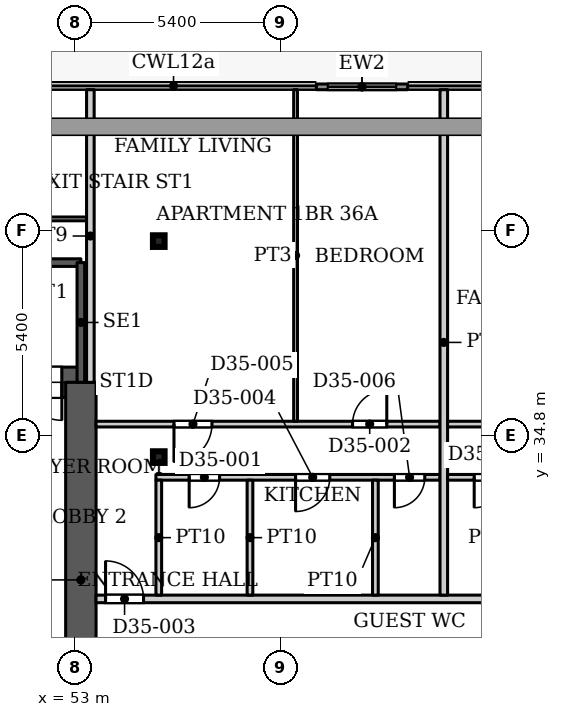
"""IFC4 building model, lengths in metres.
Left out: names, types, materials, properties, quantities, classifications, styles, units other than length and angle.
Written with IfcOpenShell. Run it as: python <this file> out.ifc"""

import sys

from ifc_helpers import new_model, si_unit, direction, frame, frame_2d, origin, origin_2d, place, context, subcontext, project, spatial, rectangle, hollow_rectangle, extrude, source, transform, mapped, element, fill, save


model = new_model("IFC4")
c1 = context("Model", 3, precision=1e-05, world=origin(), true_north=direction((0.0, 1.0)))
c2 = subcontext(c1, "Body", "Model", "MODEL_VIEW")
j1 = project(units=[si_unit("LENGTHUNIT", "METRE"), si_unit("PLANEANGLEUNIT", "RADIAN")], contexts=[c1])
p1 = place(None, origin())
s1 = spatial("IfcSite", under=j1, at=p1, CompositionType="ELEMENT")
p2 = place(p1, origin())
s2 = spatial("IfcBuilding", under=s1, at=p2, CompositionType="ELEMENT")
p3 = place(p2, frame((0.0, 0.0, 156.5)))
s3 = spatial("IfcBuildingStorey", under=s2, at=p3, CompositionType="ELEMENT", Elevation=156.5)
for number, where, z_axis, x_axis in (
    (1, (55.2, 34.232, 0.0), (0.0, 0.0, 1.0), (1.0, 0.0, 0.0)),
    (2, (55.2, 39.916, 0.0), (0.0, 0.0, 1.0), (1.0, 0.0, 0.0)),
):
    element("IfcColumn", number, at=place(p3, frame(where, z_axis=z_axis, x_axis=x_axis)), inside=s3, PredefinedType="COLUMN", context=c2, shape_type="SweptSolid", body=[
        extrude(hollow_rectangle(XDim=0.305, YDim=0.305, WallThickness=0.016, InnerFilletRadius=0.016, OuterFilletRadius=0.032, at=origin_2d()), origin(), (0.0, 0.0, 1.0), 3.9),
    ])
p4 = place(p3, frame((34.75, 36.2, 0.0), z_axis=(0.0, 0.0, 1.0), x_axis=(1.0, 0.0, 0.0)))
e3 = element("IfcWall", 3, at=p4, inside=s3, PredefinedType="SHEAR", context=c2, shape_type="SweptSolid", body=[
    extrude(rectangle(XDim=18.4, YDim=0.8, at=frame_2d((9.2, 0.0))), origin(), (0.0, 0.0, 1.0), 3.9),
])
p5 = place(p4, frame((16.9, 0.0, 0.0)))
e4 = element("IfcOpeningElement", 4, at=p5, cuts=e3, PredefinedType="OPENING", context=c2, shape_type="SweptSolid", body=[
    extrude(rectangle(XDim=1.0, YDim=2.2, at=frame_2d((0.5, 1.1))), frame((0.0, 0.41, 0.0), z_axis=(0.0, -1.0, 0.0), x_axis=(1.0, 0.0, 0.0)), (0.0, 0.0, 1.0), 0.82),
])
p6 = place(p3, frame((53.15, 25.8, 0.0), z_axis=(0.0, 0.0, 1.0), x_axis=(0.0, 1.0, 0.0)))
e5 = element("IfcWall", 5, at=p6, inside=s3, PredefinedType="SHEAR", context=c2, shape_type="SweptSolid", body=[
    extrude(rectangle(XDim=10.4, YDim=0.8, at=frame_2d((5.2, 0.0))), origin(), (0.0, 0.0, 1.0), 3.9),
])
p7 = place(p3, frame((59.347, 43.975, 0.0), z_axis=(0.0, 0.0, 1.0), x_axis=(1.0, 0.0, 0.0)))
e6 = element("IfcWall", 6, at=p7, inside=s3, PredefinedType="SOLIDWALL", context=c2, shape_type="SweptSolid", body=[
    extrude(rectangle(XDim=2.401, YDim=0.15, at=frame_2d((1.201, 0.0))), origin(), (0.0, 0.0, 1.0), 3.75),
])
p8 = place(p7, frame((0.3, 0.0, 0.0)))
e7 = element("IfcOpeningElement", 7, at=p8, cuts=e6, PredefinedType="OPENING", context=c2, shape_type="SweptSolid", body=[
    extrude(rectangle(XDim=1.8, YDim=2.4, at=frame_2d((0.9, 1.2))), frame((0.0, 0.085, 0.0), z_axis=(0.0, -1.0, 0.0), x_axis=(1.0, 0.0, 0.0)), (0.0, 0.0, 1.0), 0.17),
])
p9 = place(p3, frame((43.99, 39.35, 0.0), z_axis=(0.0, 0.0, 1.0), x_axis=(1.0, 0.0, 0.0)))
e8 = element("IfcWall", 8, at=p9, inside=s3, PredefinedType="SHEAR", context=c2, shape_type="SweptSolid", body=[
    extrude(rectangle(XDim=9.16, YDim=0.2, at=frame_2d((4.58, 0.0))), origin(), (0.0, 0.0, 1.0), 3.9),
])
p10 = place(p3, frame((53.15, 36.2, 0.0), z_axis=(0.0, 0.0, 1.0), x_axis=(0.0, 1.0, 0.0)))
e9 = element("IfcWall", 9, at=p10, inside=s3, PredefinedType="SHEAR", context=c2, shape_type="SweptSolid", body=[
    extrude(rectangle(XDim=3.15, YDim=0.2, at=frame_2d((1.575, 0.0))), origin(), (0.0, 0.0, 1.0), 3.9),
])
p11 = place(p3, frame((38.399, 40.5, 0.0), z_axis=(0.0, 0.0, 1.0), x_axis=(1.0, 0.0, 0.0)))
e10 = element("IfcWall", 10, at=p11, inside=s3, PredefinedType="PARTITIONING", context=c2, shape_type="SweptSolid", body=[
    extrude(rectangle(XDim=14.901, YDim=0.1, at=frame_2d((7.451, 0.0))), origin(), (0.0, 0.0, 1.0), 3.6),
])
p12 = place(p11, frame((6.801, 0.0, 0.0)))
e11 = element("IfcOpeningElement", 11, at=p12, cuts=e10, PredefinedType="OPENING", context=c2, shape_type="SweptSolid", body=[
    extrude(rectangle(XDim=1.0, YDim=2.1, at=frame_2d((0.5, 1.05))), frame((0.0, 0.06, 0.0), z_axis=(0.0, -1.0, 0.0), x_axis=(1.0, 0.0, 0.0)), (0.0, 0.0, 1.0), 0.12),
])
p13 = place(p3, frame((53.4, 36.199, 0.0), z_axis=(0.0, 0.0, 1.0), x_axis=(0.0, 1.0, 0.0)))
e12 = element("IfcWall", 12, at=p13, inside=s3, PredefinedType="PARTITIONING", context=c2, shape_type="SweptSolid", body=[
    extrude(rectangle(XDim=7.701, YDim=0.2, at=frame_2d((3.851, 0.0))), origin(), (0.0, 0.0, 1.0), 3.6),
])
p14 = place(p3, frame((53.549, 30.5, 0.0), z_axis=(0.0, 0.0, 1.0), x_axis=(1.0, 0.0, 0.0)))
e13 = element("IfcWall", 13, at=p14, inside=s3, PredefinedType="PARTITIONING", context=c2, shape_type="SweptSolid", body=[
    extrude(rectangle(XDim=35.551, YDim=0.2, at=frame_2d((17.775, 0.0))), origin(), (0.0, 0.0, 1.0), 3.6),
])
p15 = place(p14, frame((0.251, 0.0, 0.0)))
e14 = element("IfcOpeningElement", 14, at=p15, cuts=e13, PredefinedType="OPENING", context=c2, shape_type="SweptSolid", body=[
    extrude(rectangle(XDim=1.0, YDim=2.1, at=frame_2d((0.5, 1.05))), frame((0.0, 0.11, 0.0), z_axis=(0.0, -1.0, 0.0), x_axis=(1.0, 0.0, 0.0)), (0.0, 0.0, 1.0), 0.22),
])
p16 = place(p14, frame((21.701, 0.0, 0.0)))
e15 = element("IfcOpeningElement", 15, at=p16, cuts=e13, PredefinedType="OPENING", context=c2, shape_type="SweptSolid", body=[
    extrude(rectangle(XDim=1.0, YDim=2.1, at=frame_2d((0.5, 1.05))), frame((0.0, 0.11, 0.0), z_axis=(0.0, -1.0, 0.0), x_axis=(1.0, 0.0, 0.0)), (0.0, 0.0, 1.0), 0.22),
])
p17 = place(p14, frame((32.201, 0.0, 0.0)))
e16 = element("IfcOpeningElement", 16, at=p17, cuts=e13, PredefinedType="OPENING", context=c2, shape_type="SweptSolid", body=[
    extrude(rectangle(XDim=1.0, YDim=2.1, at=frame_2d((0.5, 1.05))), frame((0.0, 0.11, 0.0), z_axis=(0.0, -1.0, 0.0), x_axis=(1.0, 0.0, 0.0)), (0.0, 0.0, 1.0), 0.22),
])
p18 = place(p3, frame((53.549, 35.1, 0.0), z_axis=(0.0, 0.0, 1.0), x_axis=(1.0, 0.0, 0.0)))
e17 = element("IfcWall", 17, at=p18, inside=s3, PredefinedType="PARTITIONING", context=c2, shape_type="SweptSolid", body=[
    extrude(rectangle(XDim=9.051, YDim=0.15, at=frame_2d((4.525, 0.0))), origin(), (0.0, 0.0, 1.0), 3.6),
])
p19 = place(p18, frame((6.751, 0.0, 0.0)))
e18 = element("IfcOpeningElement", 18, at=p19, cuts=e17, PredefinedType="OPENING", context=c2, shape_type="SweptSolid", body=[
    extrude(rectangle(XDim=0.9, YDim=2.1, at=frame_2d((0.45, 1.05))), frame((0.0, 0.085, 0.0), z_axis=(0.0, -1.0, 0.0), x_axis=(1.0, 0.0, 0.0)), (0.0, 0.0, 1.0), 0.17),
])
p20 = place(p18, frame((2.051, 0.0, 0.0)))
e19 = element("IfcOpeningElement", 19, at=p20, cuts=e17, PredefinedType="OPENING", context=c2, shape_type="SweptSolid", body=[
    extrude(rectangle(XDim=1.0, YDim=2.1, at=frame_2d((0.5, 1.05))), frame((0.0, 0.085, 0.0), z_axis=(0.0, -1.0, 0.0), x_axis=(1.0, 0.0, 0.0)), (0.0, 0.0, 1.0), 0.17),
])
p21 = place(p3, frame((55.125, 33.7, 0.0), z_axis=(0.0, 0.0, 1.0), x_axis=(1.0, 0.0, 0.0)))
e20 = element("IfcWall", 20, at=p21, inside=s3, PredefinedType="PARTITIONING", context=c2, shape_type="SweptSolid", body=[
    extrude(rectangle(XDim=7.475, YDim=0.15, at=frame_2d((3.738, 0.0))), origin(), (0.0, 0.0, 1.0), 3.6),
])
p22 = place(p21, frame((0.875, 0.0, 0.0)))
e21 = element("IfcOpeningElement", 21, at=p22, cuts=e20, PredefinedType="OPENING", context=c2, shape_type="SweptSolid", body=[
    extrude(rectangle(XDim=0.8, YDim=2.1, at=frame_2d((0.4, 1.05))), frame((0.0, 0.085, 0.0), z_axis=(0.0, -1.0, 0.0), x_axis=(1.0, 0.0, 0.0)), (0.0, 0.0, 1.0), 0.17),
])
p23 = place(p21, frame((3.675, 0.0, 0.0)))
e22 = element("IfcOpeningElement", 22, at=p23, cuts=e20, PredefinedType="OPENING", context=c2, shape_type="SweptSolid", body=[
    extrude(rectangle(XDim=0.9, YDim=2.1, at=frame_2d((0.45, 1.05))), frame((0.0, 0.085, 0.0), z_axis=(0.0, -1.0, 0.0), x_axis=(1.0, 0.0, 0.0)), (0.0, 0.0, 1.0), 0.17),
])
p24 = place(p21, frame((6.275, 0.0, 0.0)))
e23 = element("IfcOpeningElement", 23, at=p24, cuts=e20, PredefinedType="OPENING", context=c2, shape_type="SweptSolid", body=[
    extrude(rectangle(XDim=0.8, YDim=2.1, at=frame_2d((0.4, 1.05))), frame((0.0, 0.085, 0.0), z_axis=(0.0, -1.0, 0.0), x_axis=(1.0, 0.0, 0.0)), (0.0, 0.0, 1.0), 0.17),
])
for number, where, z_axis, x_axis in (
    (24, (55.2, 30.6, 0.0), (0.0, 0.0, 1.0), (0.0, 1.0, 0.0)),
    (25, (57.6, 30.6, 0.0), (0.0, 0.0, 1.0), (0.0, 1.0, 0.0)),
):
    element("IfcWall", number, at=place(p3, frame(where, z_axis=z_axis, x_axis=x_axis)), inside=s3, PredefinedType="PARTITIONING", context=c2, shape_type="SweptSolid", body=[
        extrude(rectangle(XDim=3.025, YDim=0.15, at=frame_2d((1.512, 0.0))), origin(), (0.0, 0.0, 1.0), 3.6),
    ])
p25 = place(p3, frame((58.8, 35.175, 0.0), z_axis=(0.0, 0.0, 1.0), x_axis=(0.0, 1.0, 0.0)))
e26 = element("IfcWall", 26, at=p25, inside=s3, PredefinedType="PARTITIONING", context=c2, shape_type="SweptSolid", body=[
    extrude(rectangle(XDim=8.725, YDim=0.1, at=frame_2d((4.362, 0.0))), origin(), (0.0, 0.0, 1.0), 3.6),
])
p26 = place(p3, frame((60.9, 30.6, 0.0), z_axis=(0.0, 0.0, 1.0), x_axis=(0.0, 1.0, 0.0)))
e27 = element("IfcWall", 27, at=p26, inside=s3, PredefinedType="PARTITIONING", context=c2, shape_type="SweptSolid", body=[
    extrude(rectangle(XDim=3.025, YDim=0.15, at=frame_2d((1.512, 0.0))), origin(), (0.0, 0.0, 1.0), 3.6),
])
p27 = place(p3, frame((62.7, 30.6, 0.0), z_axis=(0.0, 0.0, 1.0), x_axis=(0.0, 1.0, 0.0)))
e28 = element("IfcWall", 28, at=p27, inside=s3, PredefinedType="PARTITIONING", context=c2, shape_type="SweptSolid", body=[
    extrude(rectangle(XDim=13.3, YDim=0.2, at=frame_2d((6.65, 0.0))), origin(), (0.0, 0.0, 1.0), 3.6),
])
p28 = place(p3, frame((62.8, 33.7, 0.0), z_axis=(0.0, 0.0, 1.0), x_axis=(1.0, 0.0, 0.0)))
e29 = element("IfcWall", 29, at=p28, inside=s3, PredefinedType="PARTITIONING", context=c2, shape_type="SweptSolid", body=[
    extrude(rectangle(XDim=11.975, YDim=0.15, at=frame_2d((5.987, 0.0))), origin(), (0.0, 0.0, 1.0), 3.6),
])
p29 = place(p28, frame((10.3, 0.0, 0.0)))
e30 = element("IfcOpeningElement", 30, at=p29, cuts=e29, PredefinedType="OPENING", context=c2, shape_type="SweptSolid", body=[
    extrude(rectangle(XDim=0.8, YDim=2.1, at=frame_2d((0.4, 1.05))), frame((0.0, 0.085, 0.0), z_axis=(0.0, -1.0, 0.0), x_axis=(1.0, 0.0, 0.0)), (0.0, 0.0, 1.0), 0.17),
])
p30 = place(p28, frame((0.7, 0.0, 0.0)))
e31 = element("IfcOpeningElement", 31, at=p30, cuts=e29, PredefinedType="OPENING", context=c2, shape_type="SweptSolid", body=[
    extrude(rectangle(XDim=0.8, YDim=2.1, at=frame_2d((0.4, 1.05))), frame((0.0, 0.085, 0.0), z_axis=(0.0, -1.0, 0.0), x_axis=(1.0, 0.0, 0.0)), (0.0, 0.0, 1.0), 0.17),
])
p31 = place(p28, frame((5.3, 0.0, 0.0)))
e32 = element("IfcOpeningElement", 32, at=p31, cuts=e29, PredefinedType="OPENING", context=c2, shape_type="SweptSolid", body=[
    extrude(rectangle(XDim=0.9, YDim=2.1, at=frame_2d((0.45, 1.05))), frame((0.0, 0.085, 0.0), z_axis=(0.0, -1.0, 0.0), x_axis=(1.0, 0.0, 0.0)), (0.0, 0.0, 1.0), 0.17),
])
p32 = place(p28, frame((8.05, 0.0, 0.0)))
e33 = element("IfcOpeningElement", 33, at=p32, cuts=e29, PredefinedType="OPENING", context=c2, shape_type="SweptSolid", body=[
    extrude(rectangle(XDim=0.8, YDim=2.1, at=frame_2d((0.4, 1.05))), frame((0.0, 0.085, 0.0), z_axis=(0.0, -1.0, 0.0), x_axis=(1.0, 0.0, 0.0)), (0.0, 0.0, 1.0), 0.17),
])
p33 = place(p28, frame((2.8, 0.0, 0.0)))
e34 = element("IfcOpeningElement", 34, at=p33, cuts=e29, PredefinedType="OPENING", context=c2, shape_type="SweptSolid", body=[
    extrude(rectangle(XDim=0.8, YDim=2.1, at=frame_2d((0.4, 1.05))), frame((0.0, 0.085, 0.0), z_axis=(0.0, -1.0, 0.0), x_axis=(1.0, 0.0, 0.0)), (0.0, 0.0, 1.0), 0.17),
])
p34 = place(p3, frame((62.8, 35.1, 0.0), z_axis=(0.0, 0.0, 1.0), x_axis=(1.0, 0.0, 0.0)))
e35 = element("IfcWall", 35, at=p34, inside=s3, PredefinedType="PARTITIONING", context=c2, shape_type="SweptSolid", body=[
    extrude(rectangle(XDim=13.9, YDim=0.15, at=frame_2d((6.95, 0.0))), origin(), (0.0, 0.0, 1.0), 3.6),
])
p35 = place(p34, frame((11.6, 0.0, 0.0)))
e36 = element("IfcOpeningElement", 36, at=p35, cuts=e35, PredefinedType="OPENING", context=c2, shape_type="SweptSolid", body=[
    extrude(rectangle(XDim=0.9, YDim=2.1, at=frame_2d((0.45, 1.05))), frame((0.0, 0.085, 0.0), z_axis=(0.0, -1.0, 0.0), x_axis=(1.0, 0.0, 0.0)), (0.0, 0.0, 1.0), 0.17),
])
p36 = place(p34, frame((1.8, 0.0, 0.0)))
e37 = element("IfcOpeningElement", 37, at=p36, cuts=e35, PredefinedType="OPENING", context=c2, shape_type="SweptSolid", body=[
    extrude(rectangle(XDim=1.0, YDim=2.1, at=frame_2d((0.5, 1.05))), frame((0.0, 0.085, 0.0), z_axis=(0.0, -1.0, 0.0), x_axis=(1.0, 0.0, 0.0)), (0.0, 0.0, 1.0), 0.17),
])
p37 = place(p34, frame((5.5, 0.0, 0.0)))
e38 = element("IfcOpeningElement", 38, at=p37, cuts=e35, PredefinedType="OPENING", context=c2, shape_type="SweptSolid", body=[
    extrude(rectangle(XDim=0.9, YDim=2.1, at=frame_2d((0.45, 1.05))), frame((0.0, 0.085, 0.0), z_axis=(0.0, -1.0, 0.0), x_axis=(1.0, 0.0, 0.0)), (0.0, 0.0, 1.0), 0.17),
])
m1 = source(origin(), c2, "Body", "SweptSolid", [
    extrude(rectangle(XDim=1.8, YDim=2.4, at=frame_2d((0.9, 1.2))), frame((0.0, 0.025, 0.0), z_axis=(0.0, -1.0, 0.0), x_axis=(1.0, 0.0, 0.0)), (0.0, 0.0, 1.0), 0.05),
])
p38 = place(p8, origin())
e39 = element("IfcDoor", 39, at=p38, inside=s3, OperationType="SLIDING_TO_LEFT", PredefinedType="DOOR", context=c2, shape_type="MappedRepresentation", body=[
    mapped(m1, transform((0.0, 0.0, 0.0), x_axis=(1.0, 0.0, 0.0), y_axis=(0.0, 1.0, 0.0), z_axis=(0.0, 0.0, 1.0), scale=1.0)),
])
fill(e7, e39)
m2 = source(origin(), c2, "Body", "SweptSolid", [
    extrude(rectangle(XDim=1.0, YDim=2.2, at=frame_2d((0.5, 1.1))), frame((0.0, 0.025, 0.0), z_axis=(0.0, -1.0, 0.0), x_axis=(1.0, 0.0, 0.0)), (0.0, 0.0, 1.0), 0.05),
])
p39 = place(p5, origin())
e40 = element("IfcDoor", 40, at=p39, inside=s3, OperationType="SINGLE_SWING_RIGHT", PredefinedType="DOOR", context=c2, shape_type="MappedRepresentation", body=[
    mapped(m2, transform((0.0, 0.0, 0.0), x_axis=(1.0, 0.0, 0.0), y_axis=(0.0, 1.0, 0.0), z_axis=(0.0, 0.0, 1.0), scale=1.0)),
])
fill(e4, e40)
m3 = source(origin(), c2, "Body", "SweptSolid", [
    extrude(rectangle(XDim=0.8, YDim=2.1, at=frame_2d((0.4, 1.05))), frame((0.0, 0.025, 0.0), z_axis=(0.0, -1.0, 0.0), x_axis=(1.0, 0.0, 0.0)), (0.0, 0.0, 1.0), 0.05),
])
p40 = place(p22, origin())
e41 = element("IfcDoor", 41, at=p40, inside=s3, OperationType="SINGLE_SWING_RIGHT", PredefinedType="DOOR", context=c2, shape_type="MappedRepresentation", body=[
    mapped(m3, transform((0.0, 0.0, 0.0), x_axis=(1.0, 0.0, 0.0), y_axis=(0.0, 1.0, 0.0), z_axis=(0.0, 0.0, 1.0), scale=1.0)),
])
fill(e21, e41)
m4 = source(origin(), c2, "Body", "SweptSolid", [
    extrude(rectangle(XDim=0.9, YDim=2.1, at=frame_2d((0.45, 1.05))), frame((0.0, 0.025, 0.0), z_axis=(0.0, -1.0, 0.0), x_axis=(1.0, 0.0, 0.0)), (0.0, 0.0, 1.0), 0.05),
])
p41 = place(p19, origin())
e42 = element("IfcDoor", 42, at=p41, inside=s3, OperationType="SINGLE_SWING_LEFT", PredefinedType="DOOR", context=c2, shape_type="MappedRepresentation", body=[
    mapped(m4, transform((0.0, 0.0, 0.0), x_axis=(1.0, 0.0, 0.0), y_axis=(0.0, 1.0, 0.0), z_axis=(0.0, 0.0, 1.0), scale=1.0)),
])
fill(e18, e42)
m5 = source(origin(), c2, "Body", "SweptSolid", [
    extrude(rectangle(XDim=1.0, YDim=2.1, at=frame_2d((0.5, 1.05))), frame((0.0, 0.025, 0.0), z_axis=(0.0, -1.0, 0.0), x_axis=(1.0, 0.0, 0.0)), (0.0, 0.0, 1.0), 0.05),
])
p42 = place(p15, origin())
e43 = element("IfcDoor", 43, at=p42, inside=s3, OperationType="SINGLE_SWING_LEFT", PredefinedType="DOOR", context=c2, shape_type="MappedRepresentation", body=[
    mapped(m5, transform((0.0, 0.0, 0.0), x_axis=(1.0, 0.0, 0.0), y_axis=(0.0, 1.0, 0.0), z_axis=(0.0, 0.0, 1.0), scale=1.0)),
])
fill(e14, e43)
p43 = place(p23, origin())
e44 = element("IfcDoor", 44, at=p43, inside=s3, OperationType="SINGLE_SWING_RIGHT", PredefinedType="DOOR", context=c2, shape_type="MappedRepresentation", body=[
    mapped(m4, transform((0.0, 0.0, 0.0), x_axis=(1.0, 0.0, 0.0), y_axis=(0.0, 1.0, 0.0), z_axis=(0.0, 0.0, 1.0), scale=1.0)),
])
fill(e22, e44)
m6 = source(origin(), c2, "Body", "SweptSolid", [
    extrude(rectangle(XDim=1.0, YDim=2.1, at=frame_2d((0.5, 1.05))), frame((0.0, 0.025, 0.0), z_axis=(0.0, -1.0, 0.0), x_axis=(1.0, 0.0, 0.0)), (0.0, 0.0, 1.0), 0.05),
])
p44 = place(p20, origin())
e45 = element("IfcDoor", 45, at=p44, inside=s3, OperationType="SINGLE_SWING_RIGHT", PredefinedType="DOOR", context=c2, shape_type="MappedRepresentation", body=[
    mapped(m6, transform((0.0, 0.0, 0.0), x_axis=(1.0, 0.0, 0.0), y_axis=(0.0, 1.0, 0.0), z_axis=(0.0, 0.0, 1.0), scale=1.0)),
])
fill(e19, e45)
p45 = place(p24, origin())
e46 = element("IfcDoor", 46, at=p45, inside=s3, OperationType="SINGLE_SWING_RIGHT", PredefinedType="DOOR", context=c2, shape_type="MappedRepresentation", body=[
    mapped(m3, transform((0.0, 0.0, 0.0), x_axis=(1.0, 0.0, 0.0), y_axis=(0.0, 1.0, 0.0), z_axis=(0.0, 0.0, 1.0), scale=1.0)),
])
fill(e23, e46)
p46 = place(p30, origin())
e47 = element("IfcDoor", 47, at=p46, inside=s3, OperationType="SINGLE_SWING_RIGHT", PredefinedType="DOOR", context=c2, shape_type="MappedRepresentation", body=[
    mapped(m3, transform((0.0, 0.0, 0.0), x_axis=(1.0, 0.0, 0.0), y_axis=(0.0, 1.0, 0.0), z_axis=(0.0, 0.0, 1.0), scale=1.0)),
])
fill(e31, e47)
save(model, sys.argv[1])
